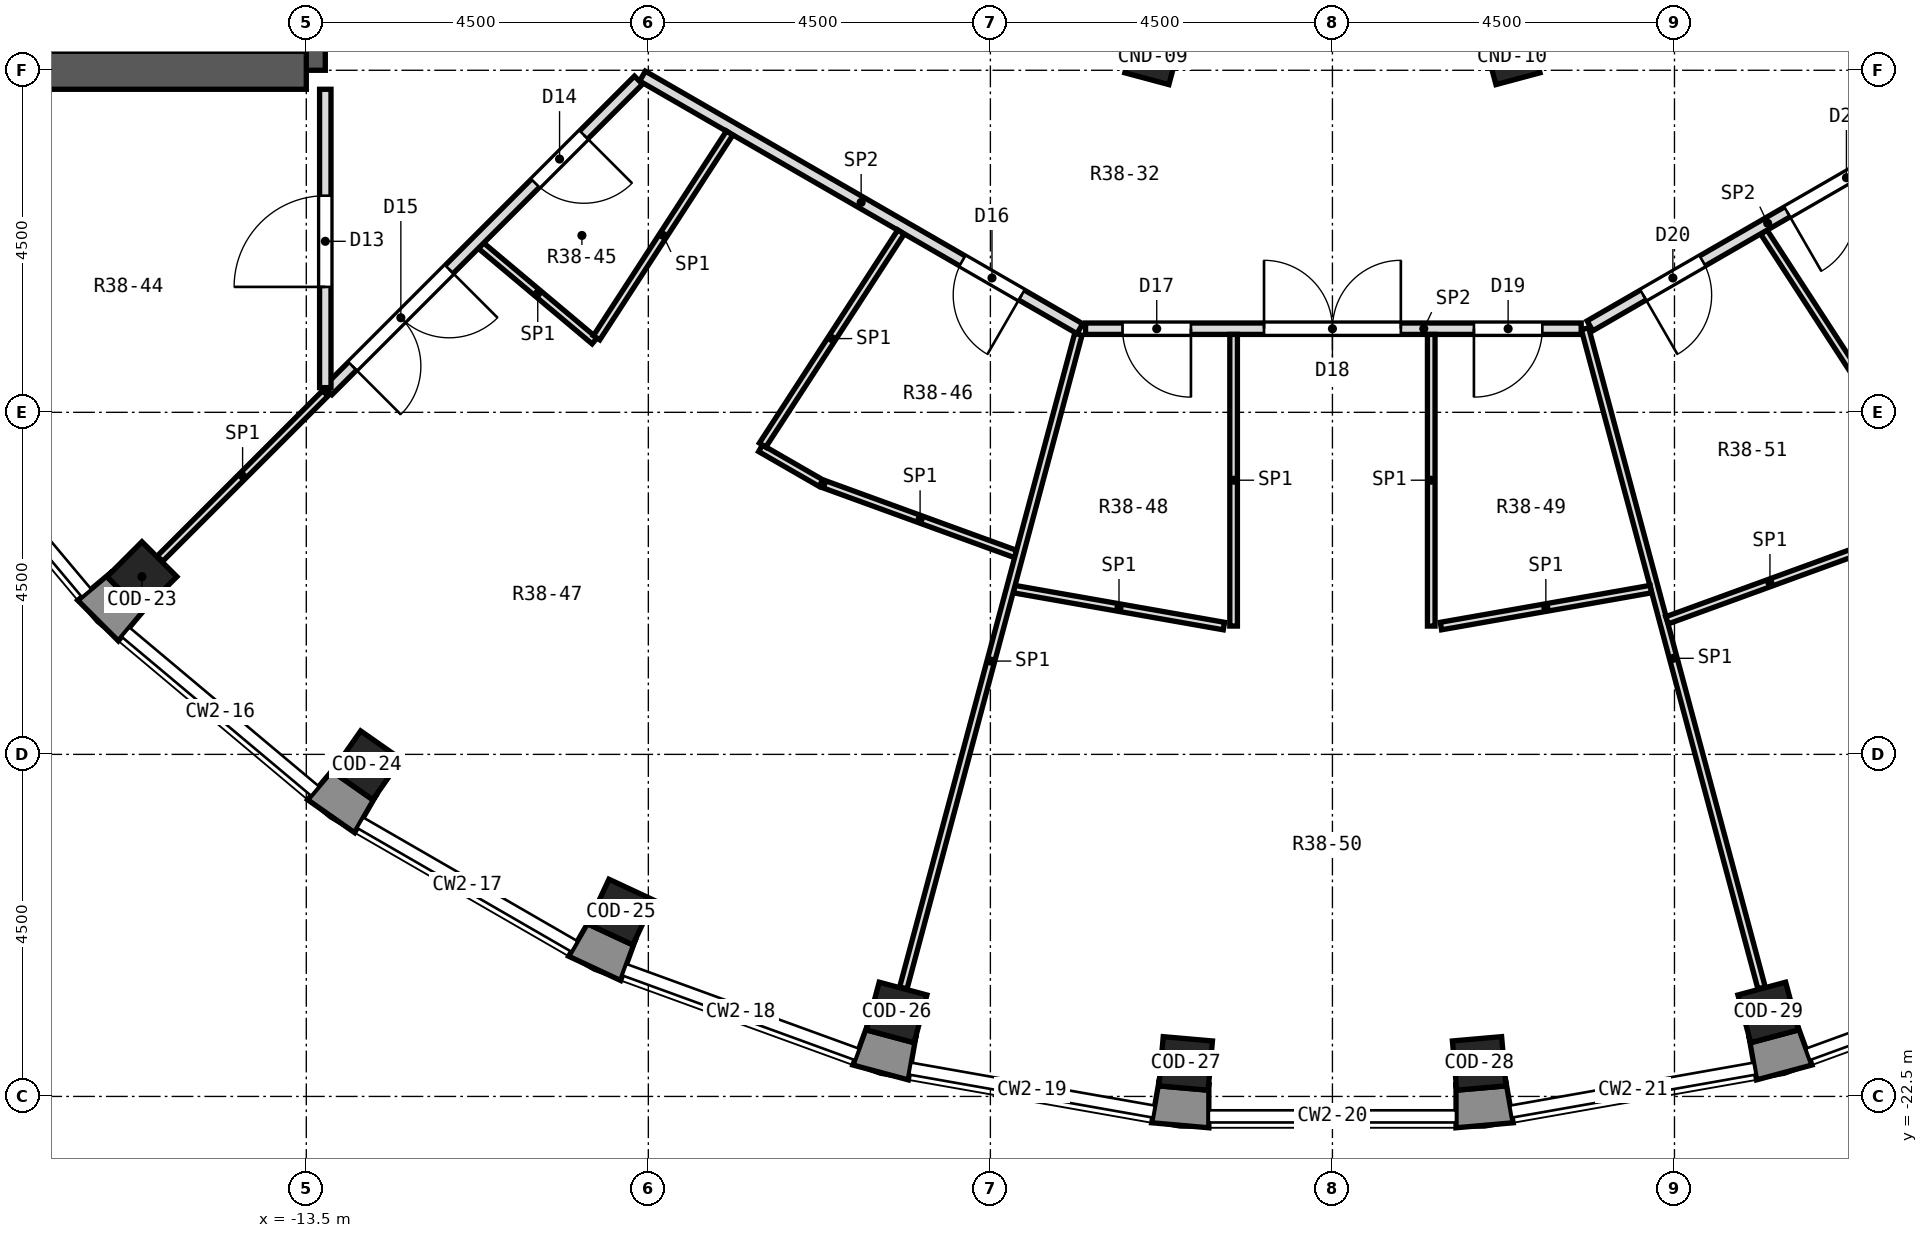
"""IFC4 building model, lengths in metres.
Left out: names, types, materials, properties, quantities, classifications, styles, units other than length and angle.
Written with IfcOpenShell. Run it as: python <this file> out.ifc"""

import sys

from ifc_helpers import new_model, si_unit, direction, frame, frame_2d, origin, origin_2d, place, context, subcontext, project, spatial, polyline, rectangle, outline, extrude, element, fill, save


model = new_model("IFC4")
c1 = context("Model", 3, precision=1e-05, world=origin(), true_north=direction((0.0, 1.0)))
c2 = subcontext(c1, "Body", "Model", "MODEL_VIEW")
j1 = project(units=[si_unit("LENGTHUNIT", "METRE"), si_unit("PLANEANGLEUNIT", "RADIAN")], contexts=[c1])
p1 = place(None, origin())
s1 = spatial("IfcSite", under=j1, at=p1, CompositionType="ELEMENT")
p2 = place(p1, origin())
s2 = spatial("IfcBuilding", under=s1, at=p2, CompositionType="ELEMENT")
p3 = place(p2, frame((0.0, 0.0, 279.2)))
s3 = spatial("IfcBuildingStorey", under=s2, at=p3, CompositionType="ELEMENT", Elevation=279.2)
for number, where, z_axis, x_axis in (
    (1, (-15.662, -15.662, 0.0), (0.0, 0.0, 1.0), (-0.707, -0.707, 0.0)),
    (2, (-12.705, -18.144, 0.0), (0.0, 0.0, 1.0), (-0.574, -0.819, 0.0)),
    (3, (-9.361, -20.075, 0.0), (0.0, 0.0, 1.0), (-0.423, -0.906, 0.0)),
    (4, (-5.733, -21.395, 0.0), (0.0, 0.0, 1.0), (-0.259, -0.966, 0.0)),
    (5, (-1.93, -22.066, 0.0), (0.0, 0.0, 1.0), (-0.087, -0.996, 0.0)),
    (6, (1.93, -22.066, 0.0), (0.0, 0.0, 1.0), (0.087, -0.996, 0.0)),
    (7, (5.733, -21.395, 0.0), (0.0, 0.0, 1.0), (0.259, -0.966, 0.0)),
):
    element("IfcColumn", number, at=place(p3, frame(where, z_axis=z_axis, x_axis=x_axis)), inside=s3, PredefinedType="COLUMN", context=c2, shape_type="SweptSolid", body=[
        extrude(rectangle(XDim=0.65, YDim=0.65, at=origin_2d()), origin(), (0.0, 0.0, 1.0), 5.0),
    ])
for number, where, z_axis, x_axis in (
    (8, (-2.364, -8.821, 0.0), (0.0, 0.0, 1.0), (-0.259, -0.966, 0.0)),
    (9, (2.364, -8.821, 0.0), (0.0, 0.0, 1.0), (0.259, -0.966, 0.0)),
):
    element("IfcColumn", number, at=place(p3, frame(where, z_axis=z_axis, x_axis=x_axis)), inside=s3, PredefinedType="COLUMN", context=c2, shape_type="SweptSolid", body=[
        extrude(rectangle(XDim=0.6, YDim=0.6, at=origin_2d()), origin(), (0.0, 0.0, 1.0), 5.0),
    ])
p4 = place(p3, frame((-13.5, -9.0, 0.0), z_axis=(0.0, 0.0, 1.0), x_axis=(0.0, 1.0, 0.0)))
e10 = element("IfcWall", 10, at=p4, inside=s3, PredefinedType="SHEAR", context=c2, shape_type="SweptSolid", body=[
    extrude(rectangle(XDim=18.0, YDim=0.5, at=frame_2d((9.0, 0.0))), origin(), (0.0, 0.0, 1.0), 5.0),
])
p5 = place(p4, frame((15.4, 0.0, 0.0)))
e11 = element("IfcOpeningElement", 11, at=p5, cuts=e10, PredefinedType="OPENING", context=c2, shape_type="SweptSolid", body=[
    extrude(rectangle(XDim=1.2, YDim=2.1, at=frame_2d((0.6, 1.05))), frame((0.0, 0.262, 0.0), z_axis=(0.0, -1.0, 0.0), x_axis=(1.0, 0.0, 0.0)), (0.0, 0.0, 1.0), 0.524),
])
p6 = place(p4, frame((1.4, 0.0, 0.0)))
e12 = element("IfcOpeningElement", 12, at=p6, cuts=e10, PredefinedType="OPENING", context=c2, shape_type="SweptSolid", body=[
    extrude(rectangle(XDim=1.2, YDim=2.1, at=frame_2d((0.6, 1.05))), frame((0.0, 0.262, 0.0), z_axis=(0.0, -1.0, 0.0), x_axis=(1.0, 0.0, 0.0)), (0.0, 0.0, 1.0), 0.524),
])
p7 = place(p4, frame((7.5, 0.0, 0.0)))
e13 = element("IfcOpeningElement", 13, at=p7, cuts=e10, PredefinedType="OPENING", context=c2, shape_type="SweptSolid", body=[
    extrude(rectangle(XDim=3.0, YDim=2.4, at=frame_2d((1.5, 1.2))), frame((0.0, 0.262, 0.0), z_axis=(0.0, -1.0, 0.0), x_axis=(1.0, 0.0, 0.0)), (0.0, 0.0, 1.0), 0.524),
])
p8 = place(p3, frame((-13.5, -9.0, 0.0), z_axis=(0.0, 0.0, 1.0), x_axis=(-1.0, 0.0, 0.0)))
e14 = element("IfcWall", 14, at=p8, inside=s3, PredefinedType="SHEAR", context=c2, shape_type="SweptSolid", body=[
    extrude(rectangle(XDim=6.0, YDim=0.5, at=frame_2d((3.0, 0.0))), origin(), (0.0, 0.0, 1.0), 5.0),
])
p9 = place(p3, origin())
e15 = element("IfcWall", 15, at=p9, inside=s3, PredefinedType="SOLIDWALL", context=c2, shape_type="SweptSolid", body=[
    extrude(outline(polyline([(-15.973, -16.507), (-15.588, -16.047), (-15.662, -16.122), (-16.122, -15.662), (-16.047, -15.588), (-16.507, -15.973), (-15.973, -16.507)])), origin(), (0.0, 0.0, 1.0), 4.45),
])
p10 = place(p3, origin())
e16 = element("IfcWall", 16, at=p10, inside=s3, PredefinedType="SOLIDWALL", context=c2, shape_type="SweptSolid", body=[
    extrude(outline(polyline([(-12.864, -19.03), (-12.564, -18.51), (-12.625, -18.597), (-13.157, -18.224), (-13.097, -18.137), (-13.482, -18.597), (-12.864, -19.03)])), origin(), (0.0, 0.0, 1.0), 4.45),
])
p11 = place(p3, origin())
e17 = element("IfcWall", 17, at=p11, inside=s3, PredefinedType="SOLIDWALL", context=c2, shape_type="SweptSolid", body=[
    extrude(outline(polyline([(-10.048, -20.656), (-9.364, -20.975), (-9.159, -20.411), (-9.204, -20.507), (-9.793, -20.232), (-9.748, -20.136), (-10.048, -20.656)])), origin(), (0.0, 0.0, 1.0), 4.45),
])
p12 = place(p3, origin())
e18 = element("IfcWall", 18, at=p12, inside=s3, PredefinedType="SOLIDWALL", context=c2, shape_type="SweptSolid", body=[
    extrude(outline(polyline([(-5.58, -22.282), (-5.476, -21.691), (-5.503, -21.793), (-6.131, -21.625), (-6.104, -21.523), (-6.309, -22.087), (-5.58, -22.282)])), origin(), (0.0, 0.0, 1.0), 4.45),
])
p13 = place(p3, origin())
e19 = element("IfcWall", 19, at=p13, inside=s3, PredefinedType="SOLIDWALL", context=c2, shape_type="SweptSolid", body=[
    extrude(outline(polyline([(-2.378, -22.847), (-1.626, -22.913), (-1.626, -22.312), (-1.635, -22.418), (-2.283, -22.361), (-2.273, -22.256), (-2.378, -22.847)])), origin(), (0.0, 0.0, 1.0), 4.45),
])
p14 = place(p3, origin())
e20 = element("IfcWall", 20, at=p14, inside=s3, PredefinedType="SOLIDWALL", context=c2, shape_type="SweptSolid", body=[
    extrude(outline(polyline([(1.626, -22.913), (2.378, -22.847), (2.273, -22.256), (2.283, -22.361), (1.635, -22.418), (1.626, -22.312), (1.626, -22.913)])), origin(), (0.0, 0.0, 1.0), 4.45),
])
p15 = place(p3, origin())
e21 = element("IfcWall", 21, at=p15, inside=s3, PredefinedType="SOLIDWALL", context=c2, shape_type="SweptSolid", body=[
    extrude(outline(polyline([(6.309, -22.087), (6.104, -21.523), (6.131, -21.625), (5.503, -21.793), (5.476, -21.691), (5.58, -22.282), (6.309, -22.087)])), origin(), (0.0, 0.0, 1.0), 4.45),
])
p16 = place(p3, frame((3.323, -12.4, 0.0), z_axis=(0.0, 0.0, 1.0), x_axis=(0.258728835498, -0.965949993365, 0.0)))
e22 = element("IfcWall", 22, at=p16, inside=s3, PredefinedType="PARTITIONING", context=c2, shape_type="SweptSolid", body=[
    extrude(rectangle(XDim=8.978, YDim=0.1, at=frame_2d((4.489, 0.0))), origin(), (0.0, 0.0, 1.0), 4.45),
])
p17 = place(p3, frame((5.676, -11.128, 0.0), z_axis=(0.0, 0.0, 1.0), x_axis=(0.544832434593, -0.838544941083, 0.0)))
e23 = element("IfcWall", 23, at=p17, inside=s3, PredefinedType="PARTITIONING", context=c2, shape_type="SweptSolid", body=[
    extrude(rectangle(XDim=4.293, YDim=0.1, at=frame_2d((2.146, 0.0))), origin(), (0.0, 0.0, 1.0), 4.45),
])
p18 = place(p3, frame((-11.202, -11.307, 0.0), z_axis=(0.0, 0.0, 1.0), x_axis=(0.765897191843, -0.642963056114, 0.0)))
e24 = element("IfcWall", 24, at=p18, inside=s3, PredefinedType="PARTITIONING", context=c2, shape_type="SweptSolid", body=[
    extrude(rectangle(XDim=1.95, YDim=0.1, at=frame_2d((0.975, 0.0))), origin(), (0.0, 0.0, 1.0), 4.45),
])
p19 = place(p3, frame((-9.077, -9.077, 0.0), z_axis=(0.0, 0.0, 1.0), x_axis=(0.865961614908, -0.500110469302, 0.0)))
e25 = element("IfcWall", 25, at=p19, inside=s3, PredefinedType="PARTITIONING", context=c2, shape_type="SweptSolid", body=[
    extrude(rectangle(XDim=6.645, YDim=0.15, at=frame_2d((3.322, 0.0))), origin(), (0.0, 0.0, 1.0), 4.45),
])
p20 = place(p19, frame((4.86, 0.0, 0.0)))
e26 = element("IfcOpeningElement", 26, at=p20, cuts=e25, PredefinedType="OPENING", context=c2, shape_type="SweptSolid", body=[
    extrude(rectangle(XDim=0.9, YDim=2.1, at=frame_2d((0.45, 1.05))), frame((0.0, 0.087, 0.0), z_axis=(0.0, -1.0, 0.0), x_axis=(1.0, 0.0, 0.0)), (0.0, 0.0, 1.0), 0.174),
])
p21 = place(p3, frame((-7.524, -13.973, 0.0), z_axis=(0.0, 0.0, 1.0), x_axis=(0.866468987099, -0.499230902886, 0.0)))
e27 = element("IfcWall", 27, at=p21, inside=s3, PredefinedType="PARTITIONING", context=c2, shape_type="SweptSolid", body=[
    extrude(rectangle(XDim=0.917, YDim=0.1, at=frame_2d((0.459, 0.0))), origin(), (0.0, 0.0, 1.0), 4.45),
])
p22 = place(p3, frame((-6.682, -14.448, 0.0), z_axis=(0.0, 0.0, 1.0), x_axis=(0.939569433945, -0.34235840693, 0.0)))
e28 = element("IfcWall", 28, at=p22, inside=s3, PredefinedType="PARTITIONING", context=c2, shape_type="SweptSolid", body=[
    extrude(rectangle(XDim=2.676, YDim=0.1, at=frame_2d((1.338, 0.0))), origin(), (0.0, 0.0, 1.0), 4.45),
])
p23 = place(p3, frame((-4.189, -15.826, 0.0), z_axis=(0.0, 0.0, 1.0), x_axis=(0.984846599315, -0.173427725056, 0.0)))
e29 = element("IfcWall", 29, at=p23, inside=s3, PredefinedType="PARTITIONING", context=c2, shape_type="SweptSolid", body=[
    extrude(rectangle(XDim=2.804, YDim=0.1, at=frame_2d((1.402, 0.0))), origin(), (0.0, 0.0, 1.0), 4.45),
])
p24 = place(p3, frame((-3.248, -12.4, 0.0), z_axis=(0.0, 0.0, 1.0), x_axis=(1.0, 0.0, 0.0)))
e30 = element("IfcWall", 30, at=p24, inside=s3, PredefinedType="PARTITIONING", context=c2, shape_type="SweptSolid", body=[
    extrude(rectangle(XDim=6.521, YDim=0.15, at=frame_2d((3.26, 0.0))), origin(), (0.0, 0.0, 1.0), 4.45),
])
p25 = place(p24, frame((0.487, 0.0, 0.0)))
e31 = element("IfcOpeningElement", 31, at=p25, cuts=e30, PredefinedType="OPENING", context=c2, shape_type="SweptSolid", body=[
    extrude(rectangle(XDim=0.9, YDim=2.1, at=frame_2d((0.45, 1.05))), frame((0.0, 0.087, 0.0), z_axis=(0.0, -1.0, 0.0), x_axis=(1.0, 0.0, 0.0)), (0.0, 0.0, 1.0), 0.174),
])
p26 = place(p24, frame((2.348, 0.0, 0.0)))
e32 = element("IfcOpeningElement", 32, at=p26, cuts=e30, PredefinedType="OPENING", context=c2, shape_type="SweptSolid", body=[
    extrude(rectangle(XDim=1.8, YDim=2.1, at=frame_2d((0.9, 1.05))), frame((0.0, 0.087, 0.0), z_axis=(0.0, -1.0, 0.0), x_axis=(1.0, 0.0, 0.0)), (0.0, 0.0, 1.0), 0.174),
])
p27 = place(p24, frame((5.11, 0.0, 0.0)))
e33 = element("IfcOpeningElement", 33, at=p27, cuts=e30, PredefinedType="OPENING", context=c2, shape_type="SweptSolid", body=[
    extrude(rectangle(XDim=0.9, YDim=2.1, at=frame_2d((0.45, 1.05))), frame((0.0, 0.087, 0.0), z_axis=(0.0, -1.0, 0.0), x_axis=(1.0, 0.0, 0.0)), (0.0, 0.0, 1.0), 0.174),
])
p28 = place(p3, frame((1.427, -16.312, 0.0), z_axis=(0.0, 0.0, 1.0), x_axis=(0.984846599315, 0.173427725056, 0.0)))
e34 = element("IfcWall", 34, at=p28, inside=s3, PredefinedType="PARTITIONING", context=c2, shape_type="SweptSolid", body=[
    extrude(rectangle(XDim=2.804, YDim=0.1, at=frame_2d((1.402, 0.0))), origin(), (0.0, 0.0, 1.0), 4.45),
])
p29 = place(p3, frame((4.402, -16.236, 0.0), z_axis=(0.0, 0.0, 1.0), x_axis=(0.939709324203, 0.341974247578, 0.0)))
e35 = element("IfcWall", 35, at=p29, inside=s3, PredefinedType="PARTITIONING", context=c2, shape_type="SweptSolid", body=[
    extrude(rectangle(XDim=2.883, YDim=0.1, at=frame_2d((1.441, 0.0))), origin(), (0.0, 0.0, 1.0), 4.45),
])
p30 = place(p3, frame((3.388, -12.363, 0.0), z_axis=(0.0, 0.0, 1.0), x_axis=(0.865967095912, 0.5001009786, 0.0)))
e36 = element("IfcWall", 36, at=p30, inside=s3, PredefinedType="PARTITIONING", context=c2, shape_type="SweptSolid", body=[
    extrude(rectangle(XDim=6.495, YDim=0.15, at=frame_2d((3.248, 0.0))), origin(), (0.0, 0.0, 1.0), 4.45),
])
p31 = place(p30, frame((0.81, 0.0, 0.0)))
e37 = element("IfcOpeningElement", 37, at=p31, cuts=e36, PredefinedType="OPENING", context=c2, shape_type="SweptSolid", body=[
    extrude(rectangle(XDim=0.9, YDim=2.1, at=frame_2d((0.45, 1.05))), frame((0.0, 0.087, 0.0), z_axis=(0.0, -1.0, 0.0), x_axis=(1.0, 0.0, 0.0)), (0.0, 0.0, 1.0), 0.174),
])
p32 = place(p30, frame((2.997, 0.0, 0.0)))
e38 = element("IfcOpeningElement", 38, at=p32, cuts=e36, PredefinedType="OPENING", context=c2, shape_type="SweptSolid", body=[
    extrude(rectangle(XDim=1.8, YDim=2.1, at=frame_2d((0.9, 1.05))), frame((0.0, 0.087, 0.0), z_axis=(0.0, -1.0, 0.0), x_axis=(1.0, 0.0, 0.0)), (0.0, 0.0, 1.0), 0.174),
])
p33 = place(p3, frame((-15.426, -15.426, 0.0), z_axis=(0.0, 0.0, 1.0), x_axis=(0.707106781187, 0.707106781187, 0.0)))
e39 = element("IfcWall", 39, at=p33, inside=s3, PredefinedType="PARTITIONING", context=c2, shape_type="SweptSolid", body=[
    extrude(rectangle(XDim=3.077, YDim=0.1, at=frame_2d((1.538, 0.0))), origin(), (0.0, 0.0, 1.0), 4.45),
])
p34 = place(p3, frame((-13.215, -13.215, 0.0), z_axis=(0.0, 0.0, 1.0), x_axis=(0.707106781187, 0.707106781187, 0.0)))
e40 = element("IfcWall", 40, at=p34, inside=s3, PredefinedType="PARTITIONING", context=c2, shape_type="SweptSolid", body=[
    extrude(rectangle(XDim=5.777, YDim=0.15, at=frame_2d((2.888, 0.0))), origin(), (0.0, 0.0, 1.0), 4.45),
])
p35 = place(p34, frame((3.859, 0.0, 0.0)))
e41 = element("IfcOpeningElement", 41, at=p35, cuts=e40, PredefinedType="OPENING", context=c2, shape_type="SweptSolid", body=[
    extrude(rectangle(XDim=0.9, YDim=2.1, at=frame_2d((0.45, 1.05))), frame((0.0, 0.087, 0.0), z_axis=(0.0, -1.0, 0.0), x_axis=(1.0, 0.0, 0.0)), (0.0, 0.0, 1.0), 0.174),
])
p36 = place(p34, frame((0.456, 0.0, 0.0)))
e42 = element("IfcOpeningElement", 42, at=p36, cuts=e40, PredefinedType="OPENING", context=c2, shape_type="SweptSolid", body=[
    extrude(rectangle(XDim=1.8, YDim=2.1, at=frame_2d((0.9, 1.05))), frame((0.0, 0.087, 0.0), z_axis=(0.0, -1.0, 0.0), x_axis=(1.0, 0.0, 0.0)), (0.0, 0.0, 1.0), 0.174),
])
p37 = place(p3, frame((-7.497, -13.931, 0.0), z_axis=(0.0, 0.0, 1.0), x_axis=(0.54476755827, 0.838587089966, 0.0)))
e43 = element("IfcWall", 43, at=p37, inside=s3, PredefinedType="PARTITIONING", context=c2, shape_type="SweptSolid", body=[
    extrude(rectangle(XDim=3.343, YDim=0.1, at=frame_2d((1.671, 0.0))), origin(), (0.0, 0.0, 1.0), 4.45),
])
p38 = place(p3, frame((-9.681, -12.519, 0.0), z_axis=(0.0, 0.0, 1.0), x_axis=(0.544873455053, 0.838518287206, 0.0)))
e44 = element("IfcWall", 44, at=p38, inside=s3, PredefinedType="PARTITIONING", context=c2, shape_type="SweptSolid", body=[
    extrude(rectangle(XDim=3.212, YDim=0.1, at=frame_2d((1.606, 0.0))), origin(), (0.0, 0.0, 1.0), 4.45),
])
p39 = place(p3, frame((-5.645, -21.072, 0.0), z_axis=(0.0, 0.0, 1.0), x_axis=(0.258659321195, 0.965968610028, 0.0)))
e45 = element("IfcWall", 45, at=p39, inside=s3, PredefinedType="PARTITIONING", context=c2, shape_type="SweptSolid", body=[
    extrude(rectangle(XDim=8.903, YDim=0.1, at=frame_2d((4.451, 0.0))), origin(), (0.0, 0.0, 1.0), 4.45),
])
for number, where, z_axis, x_axis in (
    (46, (1.3, -16.312, 0.0), (0.0, 0.0, 1.0), (0.0, 1.0, 0.0)),
    (47, (-1.3, -16.312, 0.0), (0.0, 0.0, 1.0), (0.0, 1.0, 0.0)),
):
    element("IfcWall", number, at=place(p3, frame(where, z_axis=z_axis, x_axis=x_axis)), inside=s3, PredefinedType="PARTITIONING", context=c2, shape_type="SweptSolid", body=[
        extrude(rectangle(XDim=3.837, YDim=0.1, at=frame_2d((1.918, 0.0))), origin(), (0.0, 0.0, 1.0), 4.45),
    ])
p40 = place(p3, frame((-13.25, -13.175, 0.0), z_axis=(0.0, 0.0, 1.0), x_axis=(0.0, 1.0, 0.0)))
e48 = element("IfcWall", 48, at=p40, inside=s3, PredefinedType="PARTITIONING", context=c2, shape_type="SweptSolid", body=[
    extrude(rectangle(XDim=3.925, YDim=0.15, at=frame_2d((1.962, 0.0))), origin(), (0.0, 0.0, 1.0), 4.45),
])
p41 = place(p40, frame((1.325, 0.0, 0.0)))
e49 = element("IfcOpeningElement", 49, at=p41, cuts=e48, PredefinedType="OPENING", context=c2, shape_type="SweptSolid", body=[
    extrude(rectangle(XDim=1.2, YDim=2.1, at=frame_2d((0.6, 1.05))), frame((0.0, 0.087, 0.0), z_axis=(0.0, -1.0, 0.0), x_axis=(1.0, 0.0, 0.0)), (0.0, 0.0, 1.0), 0.174),
])
p42 = place(p41, origin())
e50 = element("IfcDoor", 50, at=p42, inside=s3, OperationType="SINGLE_SWING_LEFT", PredefinedType="DOOR", context=c2, shape_type="SweptSolid", body=[
    extrude(rectangle(XDim=1.2, YDim=2.1, at=frame_2d((0.6, 1.05))), frame((0.0, 0.025, 0.0), z_axis=(0.0, -1.0, 0.0), x_axis=(1.0, 0.0, 0.0)), (0.0, 0.0, 1.0), 0.05),
])
fill(e49, e50)
p43 = place(p35, frame((0.9, 0.0, 0.0), z_axis=(0.0, 0.0, 1.0), x_axis=(-1.0, 0.0, 0.0)))
e51 = element("IfcDoor", 51, at=p43, inside=s3, OperationType="SINGLE_SWING_LEFT", PredefinedType="DOOR", context=c2, shape_type="SweptSolid", body=[
    extrude(rectangle(XDim=0.9, YDim=2.1, at=frame_2d((0.45, 1.05))), frame((0.0, 0.025, 0.0), z_axis=(0.0, -1.0, 0.0), x_axis=(1.0, 0.0, 0.0)), (0.0, 0.0, 1.0), 0.05),
])
fill(e41, e51)
p44 = place(p36, frame((1.8, 0.0, 0.0), z_axis=(0.0, 0.0, 1.0), x_axis=(-1.0, 0.0, 0.0)))
e52 = element("IfcDoor", 52, at=p44, inside=s3, OperationType="DOUBLE_DOOR_SINGLE_SWING", PredefinedType="DOOR", context=c2, shape_type="SweptSolid", body=[
    extrude(rectangle(XDim=1.8, YDim=2.1, at=frame_2d((0.9, 1.05))), frame((0.0, 0.025, 0.0), z_axis=(0.0, -1.0, 0.0), x_axis=(1.0, 0.0, 0.0)), (0.0, 0.0, 1.0), 0.05),
])
fill(e42, e52)
p45 = place(p20, frame((0.9, 0.0, 0.0), z_axis=(0.0, 0.0, 1.0), x_axis=(-1.0, 0.0, 0.0)))
e53 = element("IfcDoor", 53, at=p45, inside=s3, OperationType="SINGLE_SWING_LEFT", PredefinedType="DOOR", context=c2, shape_type="SweptSolid", body=[
    extrude(rectangle(XDim=0.9, YDim=2.1, at=frame_2d((0.45, 1.05))), frame((0.0, 0.025, 0.0), z_axis=(0.0, -1.0, 0.0), x_axis=(1.0, 0.0, 0.0)), (0.0, 0.0, 1.0), 0.05),
])
fill(e26, e53)
p46 = place(p25, frame((0.9, 0.0, 0.0), z_axis=(0.0, 0.0, 1.0), x_axis=(-1.0, 0.0, 0.0)))
e54 = element("IfcDoor", 54, at=p46, inside=s3, OperationType="SINGLE_SWING_LEFT", PredefinedType="DOOR", context=c2, shape_type="SweptSolid", body=[
    extrude(rectangle(XDim=0.9, YDim=2.1, at=frame_2d((0.45, 1.05))), frame((0.0, 0.025, 0.0), z_axis=(0.0, -1.0, 0.0), x_axis=(1.0, 0.0, 0.0)), (0.0, 0.0, 1.0), 0.05),
])
fill(e31, e54)
p47 = place(p26, origin())
e55 = element("IfcDoor", 55, at=p47, inside=s3, OperationType="DOUBLE_DOOR_SINGLE_SWING", PredefinedType="DOOR", context=c2, shape_type="SweptSolid", body=[
    extrude(rectangle(XDim=1.8, YDim=2.1, at=frame_2d((0.9, 1.05))), frame((0.0, 0.025, 0.0), z_axis=(0.0, -1.0, 0.0), x_axis=(1.0, 0.0, 0.0)), (0.0, 0.0, 1.0), 0.05),
])
fill(e32, e55)
p48 = place(p27, frame((0.9, 0.0, 0.0), z_axis=(0.0, 0.0, 1.0), x_axis=(-1.0, 0.0, 0.0)))
e56 = element("IfcDoor", 56, at=p48, inside=s3, OperationType="SINGLE_SWING_RIGHT", PredefinedType="DOOR", context=c2, shape_type="SweptSolid", body=[
    extrude(rectangle(XDim=0.9, YDim=2.1, at=frame_2d((0.45, 1.05))), frame((0.0, 0.025, 0.0), z_axis=(0.0, -1.0, 0.0), x_axis=(1.0, 0.0, 0.0)), (0.0, 0.0, 1.0), 0.05),
])
fill(e33, e56)
p49 = place(p31, frame((0.9, 0.0, 0.0), z_axis=(0.0, 0.0, 1.0), x_axis=(-1.0, 0.0, 0.0)))
e57 = element("IfcDoor", 57, at=p49, inside=s3, OperationType="SINGLE_SWING_RIGHT", PredefinedType="DOOR", context=c2, shape_type="SweptSolid", body=[
    extrude(rectangle(XDim=0.9, YDim=2.1, at=frame_2d((0.45, 1.05))), frame((0.0, 0.025, 0.0), z_axis=(0.0, -1.0, 0.0), x_axis=(1.0, 0.0, 0.0)), (0.0, 0.0, 1.0), 0.05),
])
fill(e37, e57)
p50 = place(p32, frame((1.8, 0.0, 0.0), z_axis=(0.0, 0.0, 1.0), x_axis=(-1.0, 0.0, 0.0)))
e58 = element("IfcDoor", 58, at=p50, inside=s3, OperationType="DOUBLE_DOOR_SINGLE_SWING", PredefinedType="DOOR", context=c2, shape_type="SweptSolid", body=[
    extrude(rectangle(XDim=1.8, YDim=2.1, at=frame_2d((0.9, 1.05))), frame((0.0, 0.025, 0.0), z_axis=(0.0, -1.0, 0.0), x_axis=(1.0, 0.0, 0.0)), (0.0, 0.0, 1.0), 0.05),
])
fill(e38, e58)
save(model, sys.argv[1])
